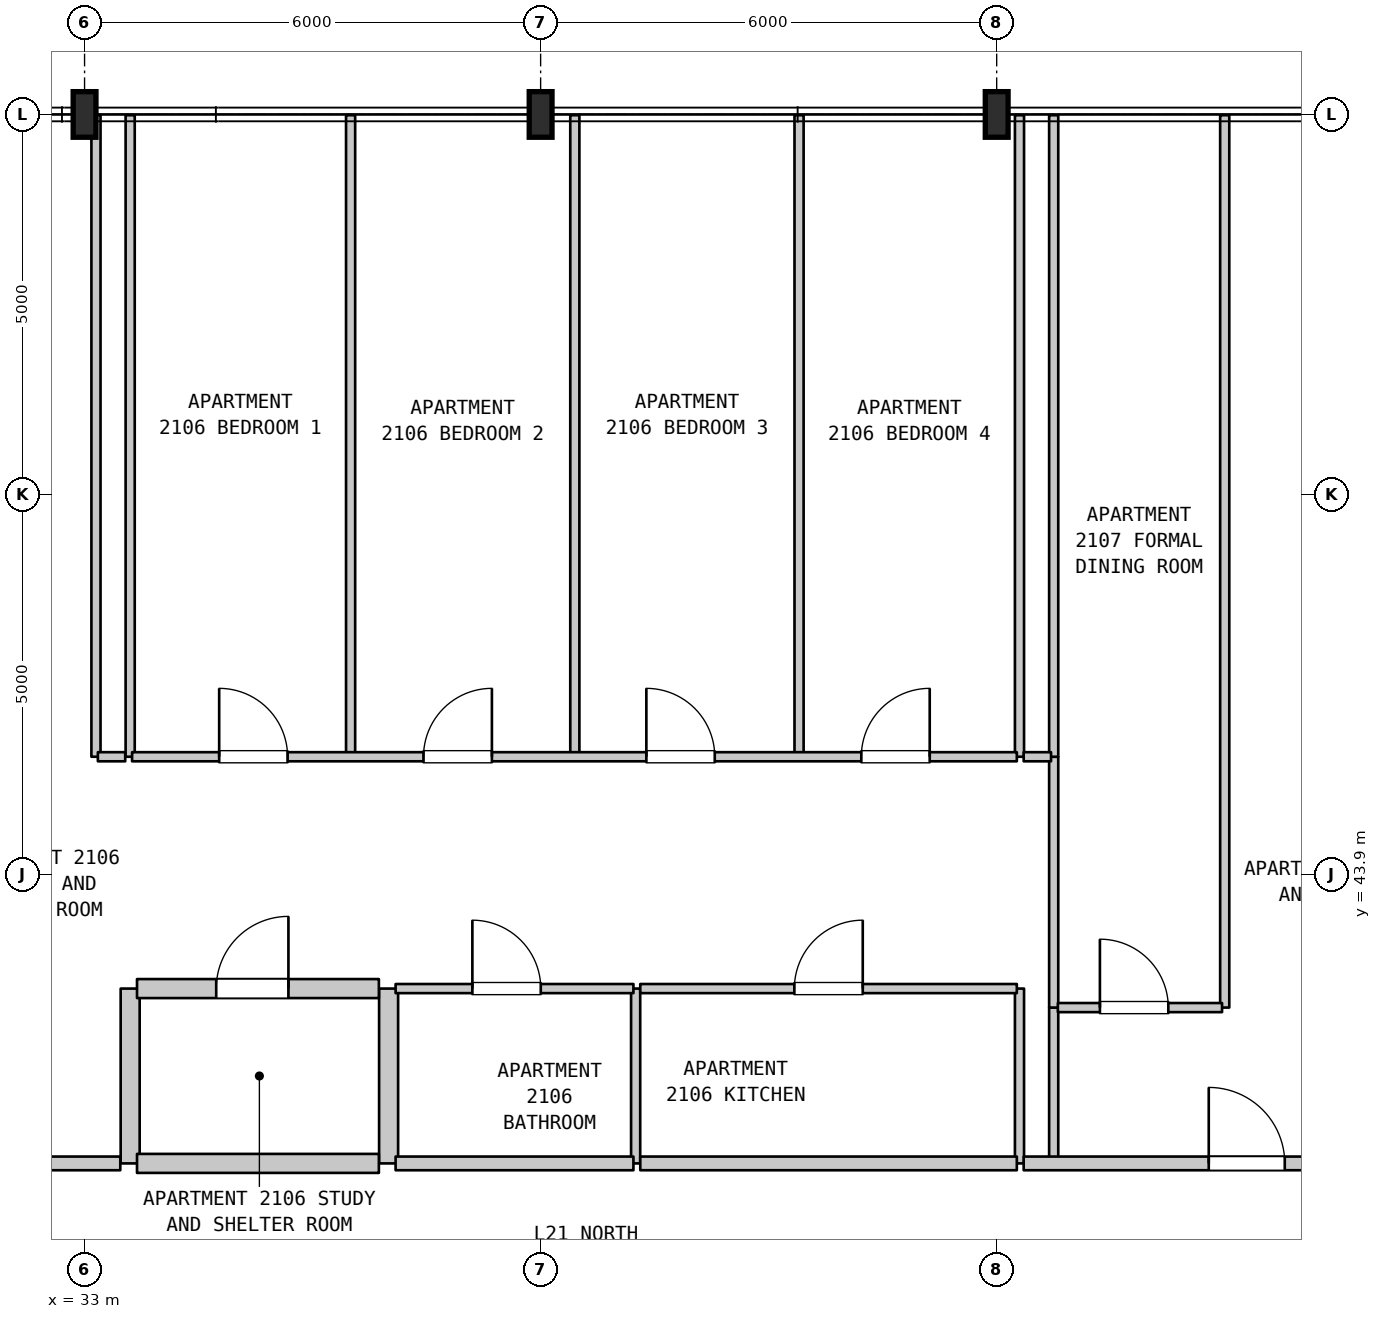
"""IFC4 building model, lengths in metres.
Left out: names, types, materials, properties, quantities, classifications, styles, units other than length and angle.
Written with IfcOpenShell. Run it as: python <this file> out.ifc"""

import sys

from ifc_helpers import new_model, si_unit, direction, frame, frame_2d, origin, origin_2d, place, context, subcontext, project, spatial, rectangle, i_section, extrude, element, fill, save


model = new_model("IFC4")
c1 = context("Model", 3, precision=1e-05, world=origin(), true_north=direction((0.0, 1.0)))
c2 = subcontext(c1, "Body", "Model", "MODEL_VIEW")
j1 = project(units=[si_unit("LENGTHUNIT", "METRE"), si_unit("PLANEANGLEUNIT", "RADIAN")], contexts=[c1])
p1 = place(None, origin())
s1 = spatial("IfcSite", under=j1, at=p1, CompositionType="ELEMENT")
p2 = place(p1, origin())
s2 = spatial("IfcBuilding", under=s1, at=p2, CompositionType="ELEMENT")
p3 = place(p2, frame((0.0, 0.0, 90.9)))
s3 = spatial("IfcBuildingStorey", under=s2, at=p3, CompositionType="ELEMENT", Elevation=90.9)
for number, where, z_axis, x_axis in (
    (1, (33.0, 53.9, 0.0), (0.0, 0.0, 1.0), (1.0, 0.0, 0.0)),
    (2, (39.0, 53.9, 0.0), (0.0, 0.0, 1.0), (1.0, 0.0, 0.0)),
    (3, (45.0, 53.9, 0.0), (0.0, 0.0, 1.0), (1.0, 0.0, 0.0)),
):
    element("IfcColumn", number, at=place(p3, frame(where, z_axis=z_axis, x_axis=x_axis)), inside=s3, PredefinedType="COLUMN", context=c2, shape_type="SweptSolid", body=[
        extrude(i_section(OverallWidth=0.3, OverallDepth=0.6, WebThickness=0.015, FlangeThickness=0.03, FilletRadius=0.027, at=origin_2d()), origin(), (0.0, 0.0, 1.0), 3.7),
    ])
p4 = place(p3, frame((33.15, 45.45, 0.0), z_axis=(0.0, 0.0, 1.0), x_axis=(0.0, 1.0, 0.0)))
e4 = element("IfcWall", 4, at=p4, inside=s3, PredefinedType="PARTITIONING", context=c2, shape_type="SweptSolid", body=[
    extrude(rectangle(XDim=8.44, YDim=0.12, at=frame_2d((4.22, 0.0))), origin(), (0.0, 0.0, 1.0), 2.785),
])
p5 = place(p3, frame((33.6, 40.1, 0.0), z_axis=(0.0, 0.0, 1.0), x_axis=(0.0, 1.0, 0.0)))
e5 = element("IfcWall", 5, at=p5, inside=s3, PredefinedType="STANDARD", context=c2, shape_type="SweptSolid", body=[
    extrude(rectangle(XDim=2.3, YDim=0.25, at=frame_2d((1.15, 0.0))), origin(), (0.0, 0.0, 1.0), 3.385),
])
for number, where, z_axis, x_axis in (
    (6, (33.6, 45.45, 0.0), (0.0, 0.0, 1.0), (0.0, 1.0, 0.0)),
    (7, (36.5, 45.45, 0.0), (0.0, 0.0, 1.0), (0.0, 1.0, 0.0)),
):
    element("IfcWall", number, at=place(p3, frame(where, z_axis=z_axis, x_axis=x_axis)), inside=s3, PredefinedType="PARTITIONING", context=c2, shape_type="SweptSolid", body=[
        extrude(rectangle(XDim=8.44, YDim=0.12, at=frame_2d((4.22, 0.0))), origin(), (0.0, 0.0, 1.0), 3.385),
    ])
p6 = place(p3, frame((37.0, 40.1, 0.0), z_axis=(0.0, 0.0, 1.0), x_axis=(0.0, 1.0, 0.0)))
e8 = element("IfcWall", 8, at=p6, inside=s3, PredefinedType="STANDARD", context=c2, shape_type="SweptSolid", body=[
    extrude(rectangle(XDim=2.3, YDim=0.25, at=frame_2d((1.15, 0.0))), origin(), (0.0, 0.0, 1.0), 3.385),
])
p7 = place(p3, frame((39.45, 45.45, 0.0), z_axis=(0.0, 0.0, 1.0), x_axis=(0.0, 1.0, 0.0)))
e9 = element("IfcWall", 9, at=p7, inside=s3, PredefinedType="PARTITIONING", context=c2, shape_type="SweptSolid", body=[
    extrude(rectangle(XDim=8.44, YDim=0.12, at=frame_2d((4.22, 0.0))), origin(), (0.0, 0.0, 1.0), 3.385),
])
p8 = place(p3, frame((40.25, 40.1, 0.0), z_axis=(0.0, 0.0, 1.0), x_axis=(0.0, 1.0, 0.0)))
e10 = element("IfcWall", 10, at=p8, inside=s3, PredefinedType="PARTITIONING", context=c2, shape_type="SweptSolid", body=[
    extrude(rectangle(XDim=2.3, YDim=0.12, at=frame_2d((1.15, 0.0))), origin(), (0.0, 0.0, 1.0), 3.385),
])
p9 = place(p3, frame((42.4, 45.45, 0.0), z_axis=(0.0, 0.0, 1.0), x_axis=(0.0, 1.0, 0.0)))
e11 = element("IfcWall", 11, at=p9, inside=s3, PredefinedType="PARTITIONING", context=c2, shape_type="SweptSolid", body=[
    extrude(rectangle(XDim=8.44, YDim=0.12, at=frame_2d((4.22, 0.0))), origin(), (0.0, 0.0, 1.0), 3.385),
])
p10 = place(p3, frame((45.3, 40.1, 0.0), z_axis=(0.0, 0.0, 1.0), x_axis=(0.0, 1.0, 0.0)))
e12 = element("IfcWall", 12, at=p10, inside=s3, PredefinedType="PARTITIONING", context=c2, shape_type="SweptSolid", body=[
    extrude(rectangle(XDim=2.3, YDim=0.12, at=frame_2d((1.15, 0.0))), origin(), (0.0, 0.0, 1.0), 3.385),
])
p11 = place(p3, frame((45.3, 45.45, 0.0), z_axis=(0.0, 0.0, 1.0), x_axis=(0.0, 1.0, 0.0)))
e13 = element("IfcWall", 13, at=p11, inside=s3, PredefinedType="PARTITIONING", context=c2, shape_type="SweptSolid", body=[
    extrude(rectangle(XDim=8.44, YDim=0.12, at=frame_2d((4.22, 0.0))), origin(), (0.0, 0.0, 1.0), 3.385),
])
p12 = place(p3, frame((45.75, 40.1, 0.0), z_axis=(0.0, 0.0, 1.0), x_axis=(0.0, 1.0, 0.0)))
e14 = element("IfcWall", 14, at=p12, inside=s3, PredefinedType="PARTITIONING", context=c2, shape_type="SweptSolid", body=[
    extrude(rectangle(XDim=2.05, YDim=0.12, at=frame_2d((1.025, 0.0))), origin(), (0.0, 0.0, 1.0), 3.385),
])
p13 = place(p3, frame((45.75, 42.15, 0.0), z_axis=(0.0, 0.0, 1.0), x_axis=(0.0, 1.0, 0.0)))
e15 = element("IfcWall", 15, at=p13, inside=s3, PredefinedType="PARTITIONING", context=c2, shape_type="SweptSolid", body=[
    extrude(rectangle(XDim=3.3, YDim=0.12, at=frame_2d((1.65, 0.0))), origin(), (0.0, 0.0, 1.0), 3.385),
])
p14 = place(p3, frame((45.75, 45.45, 0.0), z_axis=(0.0, 0.0, 1.0), x_axis=(0.0, 1.0, 0.0)))
e16 = element("IfcWall", 16, at=p14, inside=s3, PredefinedType="PARTITIONING", context=c2, shape_type="SweptSolid", body=[
    extrude(rectangle(XDim=8.44, YDim=0.12, at=frame_2d((4.22, 0.0))), origin(), (0.0, 0.0, 1.0), 3.385),
])
p15 = place(p3, frame((48.0, 42.15, 0.0), z_axis=(0.0, 0.0, 1.0), x_axis=(0.0, 1.0, 0.0)))
e17 = element("IfcWall", 17, at=p15, inside=s3, PredefinedType="PARTITIONING", context=c2, shape_type="SweptSolid", body=[
    extrude(rectangle(XDim=11.74, YDim=0.12, at=frame_2d((5.87, 0.0))), origin(), (0.0, 0.0, 1.0), 3.385),
])
p16 = place(p3, frame((28.375, 40.1, 0.0), z_axis=(0.0, 0.0, 1.0), x_axis=(1.0, 0.0, 0.0)))
e18 = element("IfcWall", 18, at=p16, inside=s3, PredefinedType="STANDARD", context=c2, shape_type="SweptSolid", body=[
    extrude(rectangle(XDim=5.095, YDim=0.18, at=frame_2d((2.547, 0.0))), origin(), (0.0, 0.0, 1.0), 3.385),
])
p17 = place(p16, frame((2.08, 0.0, 0.0)))
e19 = element("IfcOpeningElement", 19, at=p17, cuts=e18, PredefinedType="OPENING", context=c2, shape_type="SweptSolid", body=[
    extrude(rectangle(XDim=1.0, YDim=2.15, at=frame_2d((0.5, 1.075))), frame((0.0, 0.1, 0.0), z_axis=(0.0, -1.0, 0.0), x_axis=(1.0, 0.0, 0.0)), (0.0, 0.0, 1.0), 0.2),
])
p18 = place(p3, frame((33.69, 40.1, 0.0), z_axis=(0.0, 0.0, 1.0), x_axis=(1.0, 0.0, 0.0)))
e20 = element("IfcWall", 20, at=p18, inside=s3, PredefinedType="STANDARD", context=c2, shape_type="SweptSolid", body=[
    extrude(rectangle(XDim=3.182, YDim=0.25, at=frame_2d((1.591, 0.0))), origin(), (0.0, 0.0, 1.0), 3.385),
])
p19 = place(p3, frame((37.092, 40.1, 0.0), z_axis=(0.0, 0.0, 1.0), x_axis=(1.0, 0.0, 0.0)))
e21 = element("IfcWall", 21, at=p19, inside=s3, PredefinedType="STANDARD", context=c2, shape_type="SweptSolid", body=[
    extrude(rectangle(XDim=3.129, YDim=0.18, at=frame_2d((1.564, 0.0))), origin(), (0.0, 0.0, 1.0), 3.385),
])
p20 = place(p3, frame((40.311, 40.1, 0.0), z_axis=(0.0, 0.0, 1.0), x_axis=(1.0, 0.0, 0.0)))
e22 = element("IfcWall", 22, at=p20, inside=s3, PredefinedType="STANDARD", context=c2, shape_type="SweptSolid", body=[
    extrude(rectangle(XDim=4.954, YDim=0.18, at=frame_2d((2.477, 0.0))), origin(), (0.0, 0.0, 1.0), 3.385),
])
p21 = place(p3, frame((45.355, 40.1, 0.0), z_axis=(0.0, 0.0, 1.0), x_axis=(1.0, 0.0, 0.0)))
e23 = element("IfcWall", 23, at=p21, inside=s3, PredefinedType="STANDARD", context=c2, shape_type="SweptSolid", body=[
    extrude(rectangle(XDim=5.61, YDim=0.18, at=frame_2d((2.805, 0.0))), origin(), (0.0, 0.0, 1.0), 3.385),
])
p22 = place(p21, frame((2.435, 0.0, 0.0)))
e24 = element("IfcOpeningElement", 24, at=p22, cuts=e23, PredefinedType="OPENING", context=c2, shape_type="SweptSolid", body=[
    extrude(rectangle(XDim=1.0, YDim=2.15, at=frame_2d((0.5, 1.075))), frame((0.0, 0.1, 0.0), z_axis=(0.0, -1.0, 0.0), x_axis=(1.0, 0.0, 0.0)), (0.0, 0.0, 1.0), 0.2),
])
p23 = place(p3, frame((45.805, 42.15, 0.0), z_axis=(0.0, 0.0, 1.0), x_axis=(1.0, 0.0, 0.0)))
e25 = element("IfcWall", 25, at=p23, inside=s3, PredefinedType="PARTITIONING", context=c2, shape_type="SweptSolid", body=[
    extrude(rectangle(XDim=2.16, YDim=0.12, at=frame_2d((1.08, 0.0))), origin(), (0.0, 0.0, 1.0), 3.385),
])
p24 = place(p23, frame((0.553, 0.0, 0.0)))
e26 = element("IfcOpeningElement", 26, at=p24, cuts=e25, PredefinedType="OPENING", context=c2, shape_type="SweptSolid", body=[
    extrude(rectangle(XDim=0.9, YDim=2.15, at=frame_2d((0.45, 1.075))), frame((0.0, 0.07, 0.0), z_axis=(0.0, -1.0, 0.0), x_axis=(1.0, 0.0, 0.0)), (0.0, 0.0, 1.0), 0.14),
])
p25 = place(p3, frame((33.69, 42.4, 0.0), z_axis=(0.0, 0.0, 1.0), x_axis=(1.0, 0.0, 0.0)))
e27 = element("IfcWall", 27, at=p25, inside=s3, PredefinedType="STANDARD", context=c2, shape_type="SweptSolid", body=[
    extrude(rectangle(XDim=3.182, YDim=0.25, at=frame_2d((1.591, 0.0))), origin(), (0.0, 0.0, 1.0), 3.385),
])
p26 = place(p25, frame((1.042, 0.0, 0.0)))
e28 = element("IfcOpeningElement", 28, at=p26, cuts=e27, PredefinedType="OPENING", context=c2, shape_type="SweptSolid", body=[
    extrude(rectangle(XDim=0.95, YDim=2.15, at=frame_2d((0.475, 1.075))), frame((0.0, 0.135, 0.0), z_axis=(0.0, -1.0, 0.0), x_axis=(1.0, 0.0, 0.0)), (0.0, 0.0, 1.0), 0.27),
])
p27 = place(p3, frame((37.092, 42.4, 0.0), z_axis=(0.0, 0.0, 1.0), x_axis=(1.0, 0.0, 0.0)))
e29 = element("IfcWall", 29, at=p27, inside=s3, PredefinedType="PARTITIONING", context=c2, shape_type="SweptSolid", body=[
    extrude(rectangle(XDim=3.129, YDim=0.12, at=frame_2d((1.564, 0.0))), origin(), (0.0, 0.0, 1.0), 3.385),
])
p28 = place(p27, frame((1.01, 0.0, 0.0)))
e30 = element("IfcOpeningElement", 30, at=p28, cuts=e29, PredefinedType="OPENING", context=c2, shape_type="SweptSolid", body=[
    extrude(rectangle(XDim=0.9, YDim=2.1, at=frame_2d((0.45, 1.05))), frame((0.0, 0.07, 0.0), z_axis=(0.0, -1.0, 0.0), x_axis=(1.0, 0.0, 0.0)), (0.0, 0.0, 1.0), 0.14),
])
p29 = place(p3, frame((40.311, 42.4, 0.0), z_axis=(0.0, 0.0, 1.0), x_axis=(1.0, 0.0, 0.0)))
e31 = element("IfcWall", 31, at=p29, inside=s3, PredefinedType="PARTITIONING", context=c2, shape_type="SweptSolid", body=[
    extrude(rectangle(XDim=4.954, YDim=0.12, at=frame_2d((2.477, 0.0))), origin(), (0.0, 0.0, 1.0), 3.385),
])
p30 = place(p29, frame((2.027, 0.0, 0.0)))
e32 = element("IfcOpeningElement", 32, at=p30, cuts=e31, PredefinedType="OPENING", context=c2, shape_type="SweptSolid", body=[
    extrude(rectangle(XDim=0.9, YDim=2.15, at=frame_2d((0.45, 1.075))), frame((0.0, 0.07, 0.0), z_axis=(0.0, -1.0, 0.0), x_axis=(1.0, 0.0, 0.0)), (0.0, 0.0, 1.0), 0.14),
])
p31 = place(p3, frame((33.175, 45.45, 0.0), z_axis=(0.0, 0.0, 1.0), x_axis=(1.0, 0.0, 0.0)))
e33 = element("IfcWall", 33, at=p31, inside=s3, PredefinedType="PARTITIONING", context=c2, shape_type="SweptSolid", body=[
    extrude(rectangle(XDim=0.36, YDim=0.12, at=frame_2d((0.18, 0.0))), origin(), (0.0, 0.0, 1.0), 3.385),
])
p32 = place(p3, frame((33.625, 45.45, 0.0), z_axis=(0.0, 0.0, 1.0), x_axis=(1.0, 0.0, 0.0)))
e34 = element("IfcWall", 34, at=p32, inside=s3, PredefinedType="PARTITIONING", context=c2, shape_type="SweptSolid", body=[
    extrude(rectangle(XDim=11.64, YDim=0.12, at=frame_2d((5.82, 0.0))), origin(), (0.0, 0.0, 1.0), 3.385),
])
p33 = place(p32, frame((1.146, 0.0, 0.0)))
e35 = element("IfcOpeningElement", 35, at=p33, cuts=e34, PredefinedType="OPENING", context=c2, shape_type="SweptSolid", body=[
    extrude(rectangle(XDim=0.9, YDim=2.15, at=frame_2d((0.45, 1.075))), frame((0.0, 0.07, 0.0), z_axis=(0.0, -1.0, 0.0), x_axis=(1.0, 0.0, 0.0)), (0.0, 0.0, 1.0), 0.14),
])
p34 = place(p32, frame((3.834, 0.0, 0.0)))
e36 = element("IfcOpeningElement", 36, at=p34, cuts=e34, PredefinedType="OPENING", context=c2, shape_type="SweptSolid", body=[
    extrude(rectangle(XDim=0.9, YDim=2.15, at=frame_2d((0.45, 1.075))), frame((0.0, 0.07, 0.0), z_axis=(0.0, -1.0, 0.0), x_axis=(1.0, 0.0, 0.0)), (0.0, 0.0, 1.0), 0.14),
])
p35 = place(p32, frame((6.766, 0.0, 0.0)))
e37 = element("IfcOpeningElement", 37, at=p35, cuts=e34, PredefinedType="OPENING", context=c2, shape_type="SweptSolid", body=[
    extrude(rectangle(XDim=0.9, YDim=2.15, at=frame_2d((0.45, 1.075))), frame((0.0, 0.07, 0.0), z_axis=(0.0, -1.0, 0.0), x_axis=(1.0, 0.0, 0.0)), (0.0, 0.0, 1.0), 0.14),
])
p36 = place(p32, frame((9.594, 0.0, 0.0)))
e38 = element("IfcOpeningElement", 38, at=p36, cuts=e34, PredefinedType="OPENING", context=c2, shape_type="SweptSolid", body=[
    extrude(rectangle(XDim=0.9, YDim=2.15, at=frame_2d((0.45, 1.075))), frame((0.0, 0.07, 0.0), z_axis=(0.0, -1.0, 0.0), x_axis=(1.0, 0.0, 0.0)), (0.0, 0.0, 1.0), 0.14),
])
p37 = place(p3, frame((45.355, 45.45, 0.0), z_axis=(0.0, 0.0, 1.0), x_axis=(1.0, 0.0, 0.0)))
e39 = element("IfcWall", 39, at=p37, inside=s3, PredefinedType="PARTITIONING", context=c2, shape_type="SweptSolid", body=[
    extrude(rectangle(XDim=0.36, YDim=0.12, at=frame_2d((0.18, 0.0))), origin(), (0.0, 0.0, 1.0), 3.385),
])
p38 = place(p22, origin())
e40 = element("IfcDoor", 40, at=p38, inside=s3, OperationType="SINGLE_SWING_LEFT", PredefinedType="DOOR", context=c2, shape_type="SweptSolid", body=[
    extrude(rectangle(XDim=1.0, YDim=2.15, at=frame_2d((0.5, 1.075))), frame((0.0, 0.025, 0.0), z_axis=(0.0, -1.0, 0.0), x_axis=(1.0, 0.0, 0.0)), (0.0, 0.0, 1.0), 0.05),
])
fill(e24, e40)
p39 = place(p24, origin())
e41 = element("IfcDoor", 41, at=p39, inside=s3, OperationType="SINGLE_SWING_LEFT", PredefinedType="DOOR", context=c2, shape_type="SweptSolid", body=[
    extrude(rectangle(XDim=0.9, YDim=2.15, at=frame_2d((0.45, 1.075))), frame((0.0, 0.025, 0.0), z_axis=(0.0, -1.0, 0.0), x_axis=(1.0, 0.0, 0.0)), (0.0, 0.0, 1.0), 0.05),
])
fill(e26, e41)
p40 = place(p26, origin())
e42 = element("IfcDoor", 42, at=p40, inside=s3, OperationType="SINGLE_SWING_RIGHT", PredefinedType="DOOR", context=c2, shape_type="SweptSolid", body=[
    extrude(rectangle(XDim=0.95, YDim=2.15, at=frame_2d((0.475, 1.075))), frame((0.0, 0.025, 0.0), z_axis=(0.0, -1.0, 0.0), x_axis=(1.0, 0.0, 0.0)), (0.0, 0.0, 1.0), 0.05),
])
fill(e28, e42)
p41 = place(p28, origin())
e43 = element("IfcDoor", 43, at=p41, inside=s3, OperationType="SINGLE_SWING_LEFT", PredefinedType="DOOR", context=c2, shape_type="SweptSolid", body=[
    extrude(rectangle(XDim=0.9, YDim=2.1, at=frame_2d((0.45, 1.05))), frame((0.0, 0.025, 0.0), z_axis=(0.0, -1.0, 0.0), x_axis=(1.0, 0.0, 0.0)), (0.0, 0.0, 1.0), 0.05),
])
fill(e30, e43)
p42 = place(p30, origin())
e44 = element("IfcDoor", 44, at=p42, inside=s3, OperationType="SINGLE_SWING_RIGHT", PredefinedType="DOOR", context=c2, shape_type="SweptSolid", body=[
    extrude(rectangle(XDim=0.9, YDim=2.15, at=frame_2d((0.45, 1.075))), frame((0.0, 0.025, 0.0), z_axis=(0.0, -1.0, 0.0), x_axis=(1.0, 0.0, 0.0)), (0.0, 0.0, 1.0), 0.05),
])
fill(e32, e44)
p43 = place(p33, origin())
e45 = element("IfcDoor", 45, at=p43, inside=s3, OperationType="SINGLE_SWING_LEFT", PredefinedType="DOOR", context=c2, shape_type="SweptSolid", body=[
    extrude(rectangle(XDim=0.9, YDim=2.15, at=frame_2d((0.45, 1.075))), frame((0.0, 0.025, 0.0), z_axis=(0.0, -1.0, 0.0), x_axis=(1.0, 0.0, 0.0)), (0.0, 0.0, 1.0), 0.05),
])
fill(e35, e45)
p44 = place(p34, origin())
e46 = element("IfcDoor", 46, at=p44, inside=s3, OperationType="SINGLE_SWING_RIGHT", PredefinedType="DOOR", context=c2, shape_type="SweptSolid", body=[
    extrude(rectangle(XDim=0.9, YDim=2.15, at=frame_2d((0.45, 1.075))), frame((0.0, 0.025, 0.0), z_axis=(0.0, -1.0, 0.0), x_axis=(1.0, 0.0, 0.0)), (0.0, 0.0, 1.0), 0.05),
])
fill(e36, e46)
p45 = place(p35, origin())
e47 = element("IfcDoor", 47, at=p45, inside=s3, OperationType="SINGLE_SWING_LEFT", PredefinedType="DOOR", context=c2, shape_type="SweptSolid", body=[
    extrude(rectangle(XDim=0.9, YDim=2.15, at=frame_2d((0.45, 1.075))), frame((0.0, 0.025, 0.0), z_axis=(0.0, -1.0, 0.0), x_axis=(1.0, 0.0, 0.0)), (0.0, 0.0, 1.0), 0.05),
])
fill(e37, e47)
p46 = place(p36, origin())
e48 = element("IfcDoor", 48, at=p46, inside=s3, OperationType="SINGLE_SWING_RIGHT", PredefinedType="DOOR", context=c2, shape_type="SweptSolid", body=[
    extrude(rectangle(XDim=0.9, YDim=2.15, at=frame_2d((0.45, 1.075))), frame((0.0, 0.025, 0.0), z_axis=(0.0, -1.0, 0.0), x_axis=(1.0, 0.0, 0.0)), (0.0, 0.0, 1.0), 0.05),
])
fill(e38, e48)
save(model, sys.argv[1])
